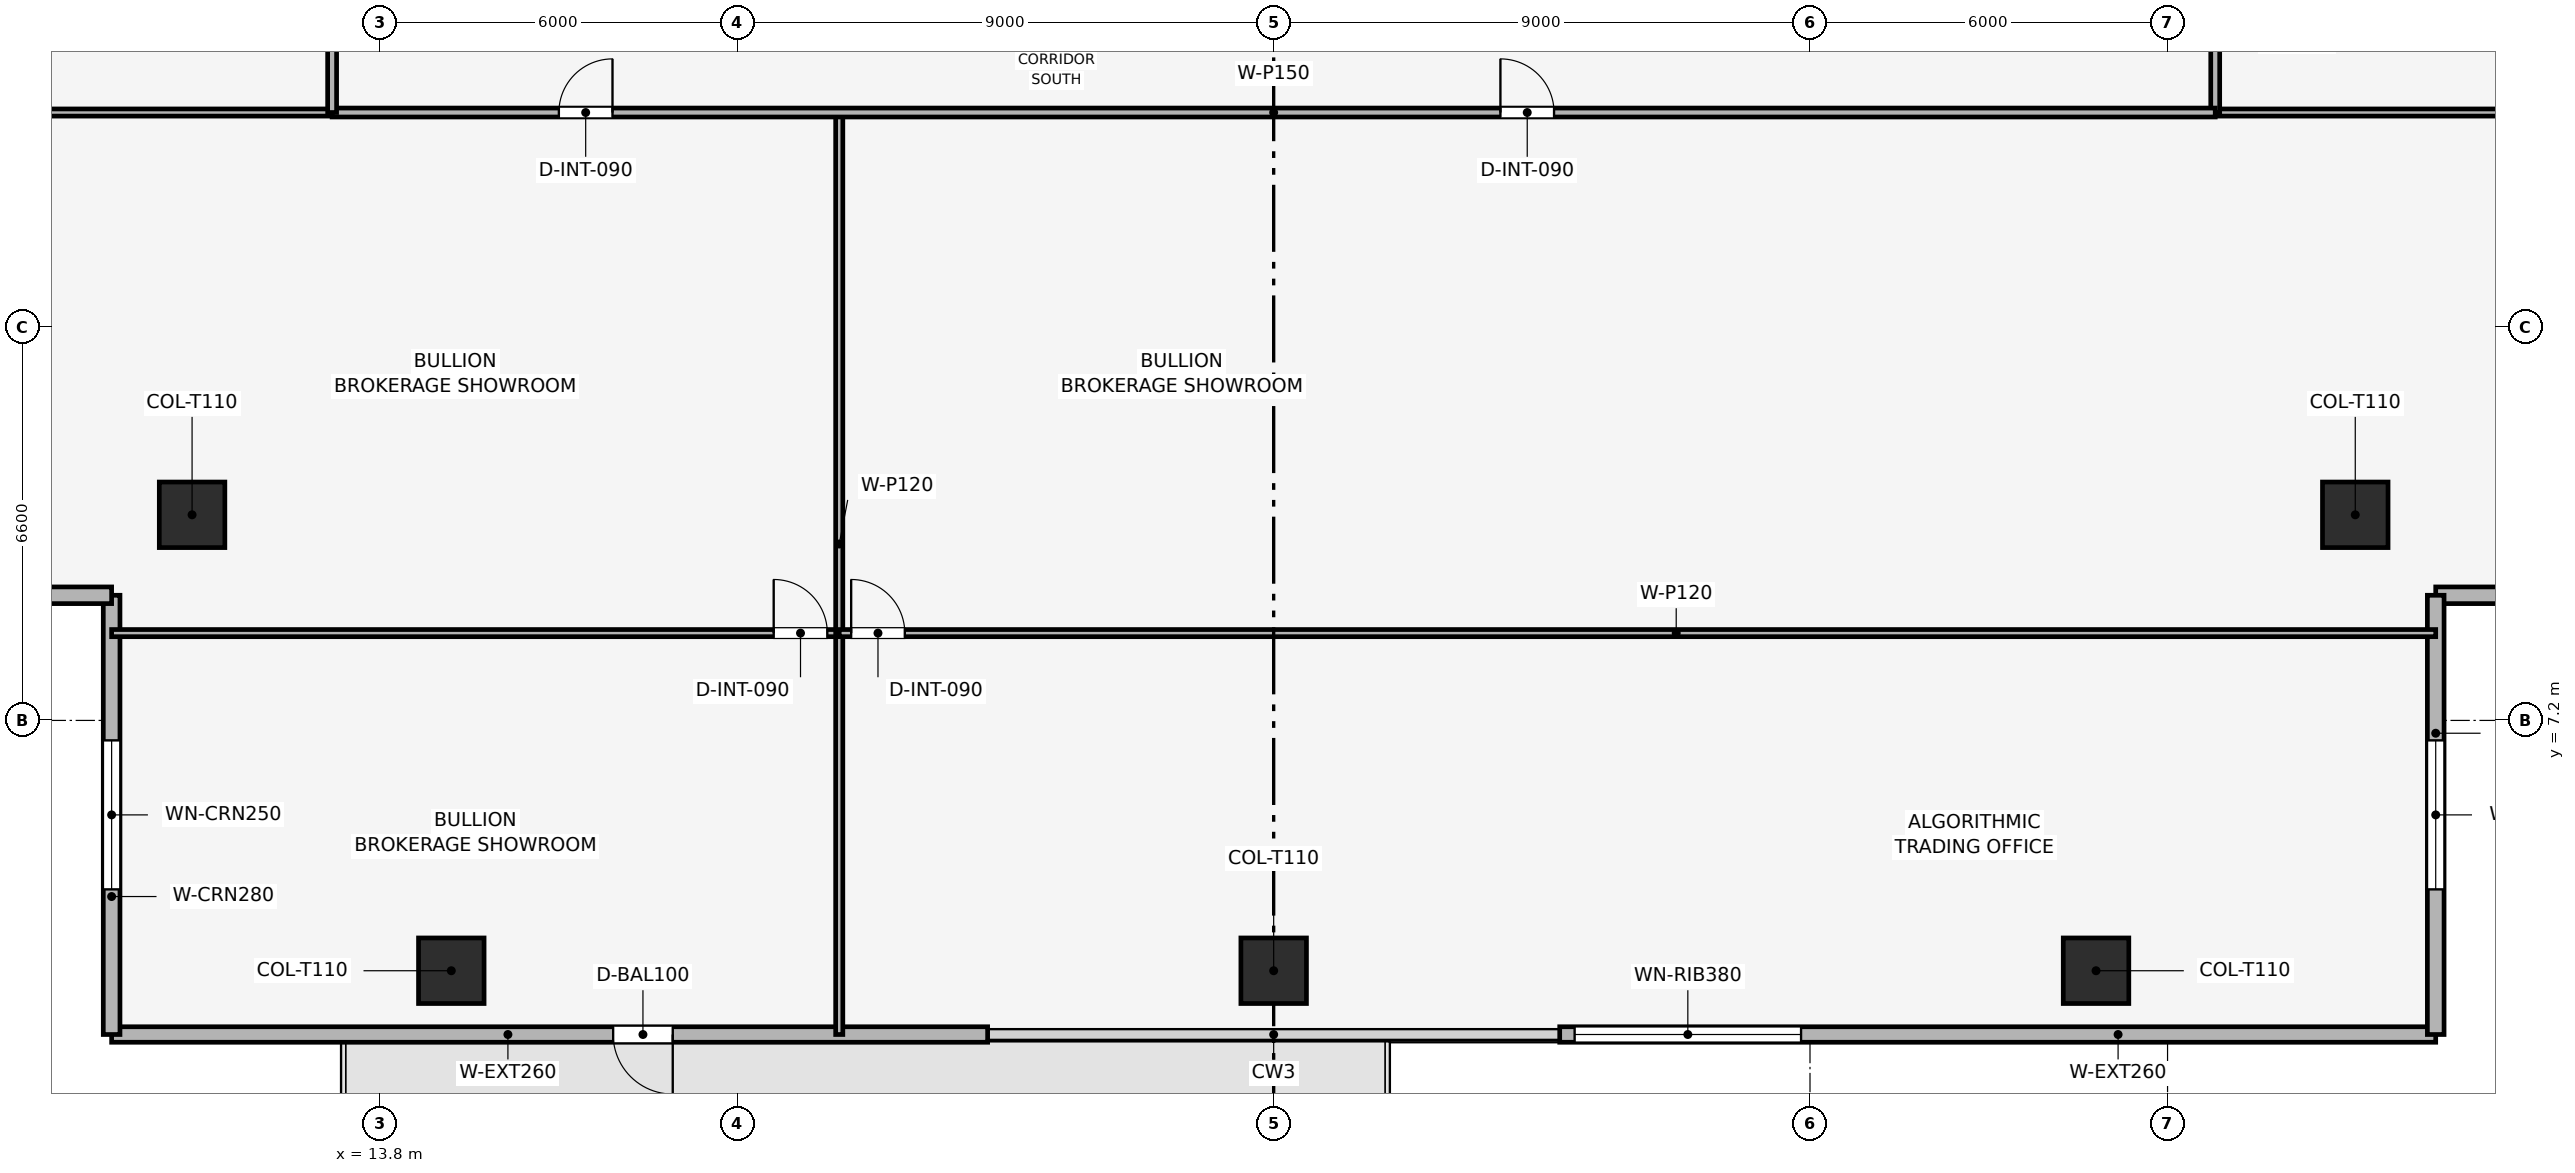
"""IFC4 building model, lengths in metres.
Left out: names, types, materials, properties, quantities, classifications, styles, units other than length and angle.
Written with IfcOpenShell. Run it as: python <this file> out.ifc"""

import sys

from ifc_helpers import new_model, si_unit, direction, frame, frame_2d, origin, origin_2d, place, context, subcontext, project, spatial, rectangle, extrude, element, fill, save


model = new_model("IFC4")
c1 = context("Model", 3, precision=1e-05, world=origin(), true_north=direction((0.0, 1.0)))
c2 = subcontext(c1, "Body", "Model", "MODEL_VIEW")
j1 = project(units=[si_unit("LENGTHUNIT", "METRE"), si_unit("PLANEANGLEUNIT", "RADIAN")], contexts=[c1])
p1 = place(None, origin())
s1 = spatial("IfcSite", under=j1, at=p1, CompositionType="ELEMENT")
p2 = place(p1, origin())
s2 = spatial("IfcBuilding", under=s1, at=p2, CompositionType="ELEMENT")
p3 = place(p2, frame((0.0, 0.0, 229.95)))
s3 = spatial("IfcBuildingStorey", under=s2, at=p3, CompositionType="ELEMENT", Elevation=229.95)
for number, where, z_axis, x_axis in (
    (1, (15.0, 3.0, 0.003), (0.0, 0.0, 1.0), (1.0, 0.0, 0.0)),
    (2, (28.8, 3.0, 0.003), (0.0, 0.0, 1.0), (1.0, 0.0, 0.0)),
    (3, (42.6, 3.0, 0.003), (0.0, 0.0, 1.0), (1.0, 0.0, 0.0)),
    (4, (10.65, 10.65, 0.003), (0.0, 0.0, 1.0), (1.0, 0.0, 0.0)),
    (5, (46.95, 10.65, 0.003), (0.0, 0.0, 1.0), (1.0, 0.0, 0.0)),
):
    element("IfcColumn", number, at=place(p3, frame(where, z_axis=z_axis, x_axis=x_axis)), inside=s3, PredefinedType="COLUMN", context=c2, shape_type="SweptSolid", body=[
        extrude(rectangle(XDim=1.1, YDim=1.1, at=origin_2d()), origin(), (0.0, 0.0, 1.0), 3.494),
    ])
p4 = place(p3, frame((48.3, 1.93, 0.0), z_axis=(0.0, 0.0, 1.0), x_axis=(-1.0, 0.0, 0.0)))
e6 = element("IfcWall", 6, at=p4, inside=s3, PredefinedType="SOLIDWALL", context=c2, shape_type="SweptSolid", body=[
    extrude(rectangle(XDim=14.7, YDim=0.26, at=frame_2d((7.35, 0.0))), origin(), (0.0, 0.0, 1.0), 3.5),
])
p5 = place(p4, frame((10.65, 0.0, 0.9)))
e7 = element("IfcOpeningElement", 7, at=p5, cuts=e6, PredefinedType="OPENING", context=c2, shape_type="SweptSolid", body=[
    extrude(rectangle(XDim=3.8, YDim=1.9, at=frame_2d((1.9, 0.95))), frame((0.0, 0.14, 0.0), z_axis=(0.0, -1.0, 0.0), x_axis=(1.0, 0.0, 0.0)), (0.0, 0.0, 1.0), 0.28),
])
p6 = place(p3, frame((24.0, 1.93, 0.0), z_axis=(0.0, 0.0, 1.0), x_axis=(-1.0, 0.0, 0.0)))
e8 = element("IfcWall", 8, at=p6, inside=s3, PredefinedType="SOLIDWALL", context=c2, shape_type="SweptSolid", body=[
    extrude(rectangle(XDim=14.7, YDim=0.26, at=frame_2d((7.35, 0.0))), origin(), (0.0, 0.0, 1.0), 3.5),
])
p7 = place(p6, frame((5.284, 0.0, 0.0)))
e9 = element("IfcOpeningElement", 9, at=p7, cuts=e8, PredefinedType="OPENING", context=c2, shape_type="SweptSolid", body=[
    extrude(rectangle(XDim=1.0, YDim=2.2, at=frame_2d((0.5, 1.1))), frame((0.0, 0.14, 0.0), z_axis=(0.0, -1.0, 0.0), x_axis=(1.0, 0.0, 0.0)), (0.0, 0.0, 1.0), 0.28),
])
p8 = place(p3, frame((9.3, 1.93, 0.0), z_axis=(0.0, 0.0, 1.0), x_axis=(0.0, 1.0, 0.0)))
e10 = element("IfcWall", 10, at=p8, inside=s3, PredefinedType="SOLIDWALL", context=c2, shape_type="SweptSolid", body=[
    extrude(rectangle(XDim=7.37, YDim=0.28, at=frame_2d((3.685, 0.0))), origin(), (0.0, 0.0, 1.0), 3.5),
])
p9 = place(p8, frame((2.435, 0.0, 0.9)))
e11 = element("IfcOpeningElement", 11, at=p9, cuts=e10, PredefinedType="OPENING", context=c2, shape_type="SweptSolid", body=[
    extrude(rectangle(XDim=2.5, YDim=1.9, at=frame_2d((1.25, 0.95))), frame((0.0, 0.15, 0.0), z_axis=(0.0, -1.0, 0.0), x_axis=(1.0, 0.0, 0.0)), (0.0, 0.0, 1.0), 0.3),
])
p10 = place(p3, frame((9.3, 9.3, 0.0), z_axis=(0.0, 0.0, 1.0), x_axis=(-1.0, 0.0, 0.0)))
e12 = element("IfcWall", 12, at=p10, inside=s3, PredefinedType="SOLIDWALL", context=c2, shape_type="SweptSolid", body=[
    extrude(rectangle(XDim=7.37, YDim=0.28, at=frame_2d((3.685, 0.0))), origin(), (0.0, 0.0, 1.0), 3.5),
])
p11 = place(p10, frame((2.435, 0.0, 0.9)))
e13 = element("IfcOpeningElement", 13, at=p11, cuts=e12, PredefinedType="OPENING", context=c2, shape_type="SweptSolid", body=[
    extrude(rectangle(XDim=2.5, YDim=1.9, at=frame_2d((1.25, 0.95))), frame((0.0, 0.15, 0.0), z_axis=(0.0, -1.0, 0.0), x_axis=(1.0, 0.0, 0.0)), (0.0, 0.0, 1.0), 0.3),
])
p12 = place(p3, frame((55.67, 9.3, 0.0), z_axis=(0.0, 0.0, 1.0), x_axis=(-1.0, 0.0, 0.0)))
e14 = element("IfcWall", 14, at=p12, inside=s3, PredefinedType="SOLIDWALL", context=c2, shape_type="SweptSolid", body=[
    extrude(rectangle(XDim=7.37, YDim=0.28, at=frame_2d((3.685, 0.0))), origin(), (0.0, 0.0, 1.0), 3.5),
])
p13 = place(p12, frame((2.435, 0.0, 0.9)))
e15 = element("IfcOpeningElement", 15, at=p13, cuts=e14, PredefinedType="OPENING", context=c2, shape_type="SweptSolid", body=[
    extrude(rectangle(XDim=2.5, YDim=1.9, at=frame_2d((1.25, 0.95))), frame((0.0, 0.15, 0.0), z_axis=(0.0, -1.0, 0.0), x_axis=(1.0, 0.0, 0.0)), (0.0, 0.0, 1.0), 0.3),
])
p14 = place(p3, frame((48.3, 9.3, 0.0), z_axis=(0.0, 0.0, 1.0), x_axis=(0.0, -1.0, 0.0)))
e16 = element("IfcWall", 16, at=p14, inside=s3, PredefinedType="SOLIDWALL", context=c2, shape_type="SweptSolid", body=[
    extrude(rectangle(XDim=7.37, YDim=0.28, at=frame_2d((3.685, 0.0))), origin(), (0.0, 0.0, 1.0), 3.5),
])
p15 = place(p14, frame((2.435, 0.0, 0.9)))
e17 = element("IfcOpeningElement", 17, at=p15, cuts=e16, PredefinedType="OPENING", context=c2, shape_type="SweptSolid", body=[
    extrude(rectangle(XDim=2.5, YDim=1.9, at=frame_2d((1.25, 0.95))), frame((0.0, 0.15, 0.0), z_axis=(0.0, -1.0, 0.0), x_axis=(1.0, 0.0, 0.0)), (0.0, 0.0, 1.0), 0.3),
])
p16 = place(p3, frame((9.3, 8.665, 0.0), z_axis=(0.0, 0.0, 1.0), x_axis=(1.0, 0.0, 0.0)))
e18 = element("IfcWall", 18, at=p16, inside=s3, PredefinedType="PARTITIONING", context=c2, shape_type="SweptSolid", body=[
    extrude(rectangle(XDim=12.21, YDim=0.12, at=frame_2d((6.105, 0.0))), origin(), (0.0, 0.0, 1.0), 2.885),
])
p17 = place(p16, frame((11.11, 0.0, 0.0)))
e19 = element("IfcOpeningElement", 19, at=p17, cuts=e18, PredefinedType="OPENING", context=c2, shape_type="SweptSolid", body=[
    extrude(rectangle(XDim=0.9, YDim=2.1, at=frame_2d((0.45, 1.05))), frame((0.0, 0.07, 0.0), z_axis=(0.0, -1.0, 0.0), x_axis=(1.0, 0.0, 0.0)), (0.0, 0.0, 1.0), 0.14),
])
p18 = place(p3, frame((21.51, 1.93, 0.0), z_axis=(0.0, 0.0, 1.0), x_axis=(0.0, 1.0, 0.0)))
e20 = element("IfcWall", 20, at=p18, inside=s3, PredefinedType="PARTITIONING", context=c2, shape_type="SweptSolid", body=[
    extrude(rectangle(XDim=15.47, YDim=0.12, at=frame_2d((7.735, 0.0))), origin(), (0.0, 0.0, 1.0), 2.885),
])
p19 = place(p3, frame((21.51, 8.665, 0.0), z_axis=(0.0, 0.0, 1.0), x_axis=(1.0, 0.0, 0.0)))
e21 = element("IfcWall", 21, at=p19, inside=s3, PredefinedType="PARTITIONING", context=c2, shape_type="SweptSolid", body=[
    extrude(rectangle(XDim=26.79, YDim=0.12, at=frame_2d((13.395, 0.0))), origin(), (0.0, 0.0, 1.0), 2.885),
])
p20 = place(p19, frame((0.2, 0.0, 0.0)))
e22 = element("IfcOpeningElement", 22, at=p20, cuts=e21, PredefinedType="OPENING", context=c2, shape_type="SweptSolid", body=[
    extrude(rectangle(XDim=0.9, YDim=2.1, at=frame_2d((0.45, 1.05))), frame((0.0, 0.07, 0.0), z_axis=(0.0, -1.0, 0.0), x_axis=(1.0, 0.0, 0.0)), (0.0, 0.0, 1.0), 0.14),
])
p21 = place(p3, frame((1.93, 17.4, 0.0), z_axis=(0.0, 0.0, 1.0), x_axis=(1.0, 0.0, 0.0)))
e23 = element("IfcWall", 23, at=p21, inside=s3, PredefinedType="PARTITIONING", context=c2, shape_type="SweptSolid", body=[
    extrude(rectangle(XDim=11.07, YDim=0.12, at=frame_2d((5.535, 0.0))), origin(), (0.0, 0.0, 1.0), 2.885),
])
p22 = place(p3, frame((44.6, 17.4, 0.0), z_axis=(0.0, 0.0, 1.0), x_axis=(1.0, 0.0, 0.0)))
e24 = element("IfcWall", 24, at=p22, inside=s3, PredefinedType="PARTITIONING", context=c2, shape_type="SweptSolid", body=[
    extrude(rectangle(XDim=11.07, YDim=0.12, at=frame_2d((5.535, 0.0))), origin(), (0.0, 0.0, 1.0), 2.885),
])
p23 = place(p3, frame((44.6, 17.4, 0.0), z_axis=(0.0, 0.0, 1.0), x_axis=(0.0, 1.0, 0.0)))
e25 = element("IfcWall", 25, at=p23, inside=s3, PredefinedType="PARTITIONING", context=c2, shape_type="SweptSolid", body=[
    extrude(rectangle(XDim=2.4, YDim=0.15, at=frame_2d((1.2, 0.0))), origin(), (0.0, 0.0, 1.0), 3.5),
])
p24 = place(p3, frame((13.0, 17.4, 0.0), z_axis=(0.0, 0.0, 1.0), x_axis=(1.0, 0.0, 0.0)))
e26 = element("IfcWall", 26, at=p24, inside=s3, PredefinedType="PARTITIONING", context=c2, shape_type="SweptSolid", body=[
    extrude(rectangle(XDim=31.6, YDim=0.15, at=frame_2d((15.8, 0.0))), origin(), (0.0, 0.0, 1.0), 3.035),
])
p25 = place(p24, frame((3.805, 0.0, 0.0)))
e27 = element("IfcOpeningElement", 27, at=p25, cuts=e26, PredefinedType="OPENING", context=c2, shape_type="SweptSolid", body=[
    extrude(rectangle(XDim=0.9, YDim=2.1, at=frame_2d((0.45, 1.05))), frame((0.0, 0.085, 0.0), z_axis=(0.0, -1.0, 0.0), x_axis=(1.0, 0.0, 0.0)), (0.0, 0.0, 1.0), 0.17),
])
p26 = place(p24, frame((19.605, 0.0, 0.0)))
e28 = element("IfcOpeningElement", 28, at=p26, cuts=e26, PredefinedType="OPENING", context=c2, shape_type="SweptSolid", body=[
    extrude(rectangle(XDim=0.9, YDim=2.1, at=frame_2d((0.45, 1.05))), frame((0.0, 0.085, 0.0), z_axis=(0.0, -1.0, 0.0), x_axis=(1.0, 0.0, 0.0)), (0.0, 0.0, 1.0), 0.17),
])
p27 = place(p3, frame((13.0, 17.4, 0.0), z_axis=(0.0, 0.0, 1.0), x_axis=(0.0, 1.0, 0.0)))
e29 = element("IfcWall", 29, at=p27, inside=s3, PredefinedType="PARTITIONING", context=c2, shape_type="SweptSolid", body=[
    extrude(rectangle(XDim=22.8, YDim=0.15, at=frame_2d((11.4, 0.0))), origin(), (0.0, 0.0, 1.0), 3.035),
])
p28 = place(p27, frame((3.1, 0.0, 0.0)))
e30 = element("IfcOpeningElement", 30, at=p28, cuts=e29, PredefinedType="OPENING", context=c2, shape_type="SweptSolid", body=[
    extrude(rectangle(XDim=0.9, YDim=2.1, at=frame_2d((0.45, 1.05))), frame((0.0, 0.085, 0.0), z_axis=(0.0, -1.0, 0.0), x_axis=(1.0, 0.0, 0.0)), (0.0, 0.0, 1.0), 0.17),
])
p29 = place(p27, frame((6.529, 0.0, 0.0)))
e31 = element("IfcOpeningElement", 31, at=p29, cuts=e29, PredefinedType="OPENING", context=c2, shape_type="SweptSolid", body=[
    extrude(rectangle(XDim=0.9, YDim=2.1, at=frame_2d((0.45, 1.05))), frame((0.0, 0.085, 0.0), z_axis=(0.0, -1.0, 0.0), x_axis=(1.0, 0.0, 0.0)), (0.0, 0.0, 1.0), 0.17),
])
p30 = place(p27, frame((10.957, 0.0, 0.0)))
e32 = element("IfcOpeningElement", 32, at=p30, cuts=e29, PredefinedType="OPENING", context=c2, shape_type="SweptSolid", body=[
    extrude(rectangle(XDim=0.9, YDim=2.1, at=frame_2d((0.45, 1.05))), frame((0.0, 0.085, 0.0), z_axis=(0.0, -1.0, 0.0), x_axis=(1.0, 0.0, 0.0)), (0.0, 0.0, 1.0), 0.17),
])
p31 = place(p27, frame((16.527, 0.0, 0.0)))
e33 = element("IfcOpeningElement", 33, at=p31, cuts=e29, PredefinedType="OPENING", context=c2, shape_type="SweptSolid", body=[
    extrude(rectangle(XDim=0.9, YDim=2.1, at=frame_2d((0.45, 1.05))), frame((0.0, 0.085, 0.0), z_axis=(0.0, -1.0, 0.0), x_axis=(1.0, 0.0, 0.0)), (0.0, 0.0, 1.0), 0.17),
])
p32 = place(p7, origin())
e34 = element("IfcDoor", 34, at=p32, inside=s3, OperationType="SINGLE_SWING_LEFT", PredefinedType="DOOR", context=c2, shape_type="SweptSolid", body=[
    extrude(rectangle(XDim=1.0, YDim=2.2, at=frame_2d((0.5, 1.1))), frame((0.0, 0.025, 0.0), z_axis=(0.0, -1.0, 0.0), x_axis=(1.0, 0.0, 0.0)), (0.0, 0.0, 1.0), 0.05),
])
fill(e9, e34)
p33 = place(p5, origin())
e35 = element("IfcWindow", 35, at=p33, inside=s3, PartitioningType="SINGLE_PANEL", PredefinedType="WINDOW", context=c2, shape_type="SweptSolid", body=[
    extrude(rectangle(XDim=3.8, YDim=1.9, at=frame_2d((1.9, 0.95))), frame((0.0, 0.03, 0.0), z_axis=(0.0, -1.0, 0.0), x_axis=(1.0, 0.0, 0.0)), (0.0, 0.0, 1.0), 0.06),
])
fill(e7, e35)
p34 = place(p9, origin())
e36 = element("IfcWindow", 36, at=p34, inside=s3, PartitioningType="SINGLE_PANEL", PredefinedType="WINDOW", context=c2, shape_type="SweptSolid", body=[
    extrude(rectangle(XDim=2.5, YDim=1.9, at=frame_2d((1.25, 0.95))), frame((0.0, 0.03, 0.0), z_axis=(0.0, -1.0, 0.0), x_axis=(1.0, 0.0, 0.0)), (0.0, 0.0, 1.0), 0.06),
])
fill(e11, e36)
p35 = place(p15, origin())
e37 = element("IfcWindow", 37, at=p35, inside=s3, PartitioningType="SINGLE_PANEL", PredefinedType="WINDOW", context=c2, shape_type="SweptSolid", body=[
    extrude(rectangle(XDim=2.5, YDim=1.9, at=frame_2d((1.25, 0.95))), frame((0.0, 0.03, 0.0), z_axis=(0.0, -1.0, 0.0), x_axis=(1.0, 0.0, 0.0)), (0.0, 0.0, 1.0), 0.06),
])
fill(e17, e37)
p36 = place(p17, origin())
e38 = element("IfcDoor", 38, at=p36, inside=s3, OperationType="SINGLE_SWING_LEFT", PredefinedType="DOOR", context=c2, shape_type="SweptSolid", body=[
    extrude(rectangle(XDim=0.9, YDim=2.1, at=frame_2d((0.45, 1.05))), frame((0.0, 0.025, 0.0), z_axis=(0.0, -1.0, 0.0), x_axis=(1.0, 0.0, 0.0)), (0.0, 0.0, 1.0), 0.05),
])
fill(e19, e38)
p37 = place(p20, origin())
e39 = element("IfcDoor", 39, at=p37, inside=s3, OperationType="SINGLE_SWING_LEFT", PredefinedType="DOOR", context=c2, shape_type="SweptSolid", body=[
    extrude(rectangle(XDim=0.9, YDim=2.1, at=frame_2d((0.45, 1.05))), frame((0.0, 0.025, 0.0), z_axis=(0.0, -1.0, 0.0), x_axis=(1.0, 0.0, 0.0)), (0.0, 0.0, 1.0), 0.05),
])
fill(e22, e39)
p38 = place(p25, origin())
e40 = element("IfcDoor", 40, at=p38, inside=s3, OperationType="SINGLE_SWING_RIGHT", PredefinedType="DOOR", context=c2, shape_type="SweptSolid", body=[
    extrude(rectangle(XDim=0.9, YDim=2.1, at=frame_2d((0.45, 1.05))), frame((0.0, 0.025, 0.0), z_axis=(0.0, -1.0, 0.0), x_axis=(1.0, 0.0, 0.0)), (0.0, 0.0, 1.0), 0.05),
])
fill(e27, e40)
p39 = place(p26, origin())
e41 = element("IfcDoor", 41, at=p39, inside=s3, OperationType="SINGLE_SWING_LEFT", PredefinedType="DOOR", context=c2, shape_type="SweptSolid", body=[
    extrude(rectangle(XDim=0.9, YDim=2.1, at=frame_2d((0.45, 1.05))), frame((0.0, 0.025, 0.0), z_axis=(0.0, -1.0, 0.0), x_axis=(1.0, 0.0, 0.0)), (0.0, 0.0, 1.0), 0.05),
])
fill(e28, e41)
save(model, sys.argv[1])
